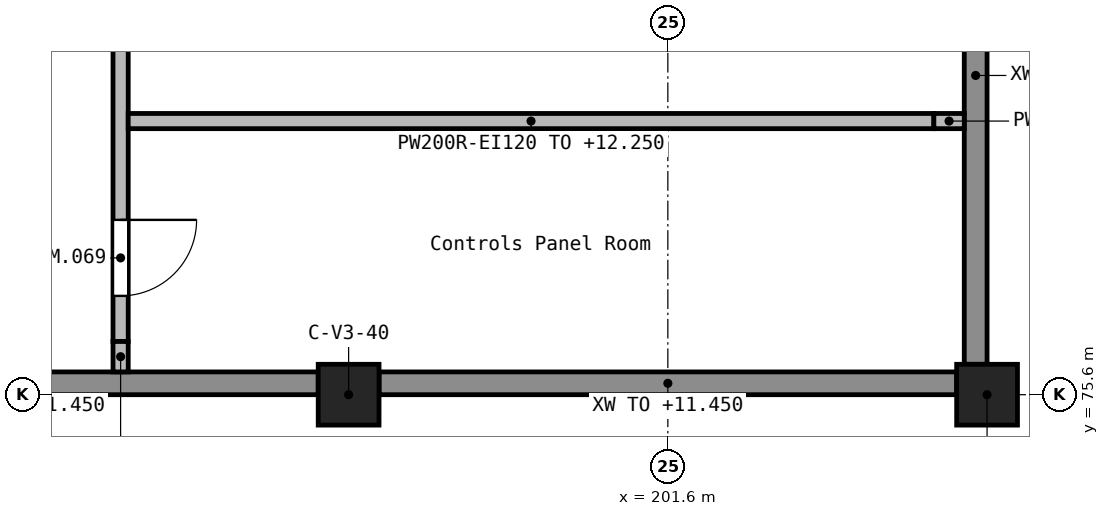
"""IFC4 building model, lengths in metres.
Left out: names, types, materials, properties, quantities, classifications, styles, units other than length and angle.
Written with IfcOpenShell. Run it as: python <this file> out.ifc"""

import sys

from ifc_helpers import new_model, si_unit, direction, frame, frame_2d, origin, origin_2d, place, context, subcontext, project, spatial, rectangle, extrude, element, fill, save


model = new_model("IFC4")
c1 = context("Model", 3, precision=1e-05, world=origin(), true_north=direction((0.0, 1.0)))
c2 = subcontext(c1, "Body", "Model", "MODEL_VIEW")
j1 = project(units=[si_unit("LENGTHUNIT", "METRE"), si_unit("PLANEANGLEUNIT", "RADIAN")], contexts=[c1])
p1 = place(None, origin())
s1 = spatial("IfcSite", under=j1, at=p1, CompositionType="ELEMENT")
p2 = place(p1, origin())
s2 = spatial("IfcBuilding", under=s1, at=p2, CompositionType="ELEMENT")
p3 = place(p2, frame((0.0, 0.0, 9.9)))
s3 = spatial("IfcBuildingStorey", under=s2, at=p3, CompositionType="ELEMENT", Elevation=9.9)
for number, where, z_axis, x_axis in (
    (1, (197.4, 75.6, 0.0), (0.0, 0.0, 1.0), (1.0, 0.0, 0.0)),
    (2, (205.8, 75.6, 0.0), (0.0, 0.0, 1.0), (1.0, 0.0, 0.0)),
):
    element("IfcColumn", number, at=place(p3, frame(where, z_axis=z_axis, x_axis=x_axis)), inside=s3, PredefinedType="COLUMN", context=c2, shape_type="SweptSolid", body=[
        extrude(rectangle(XDim=0.8, YDim=0.8, at=origin_2d()), origin(), (0.0, 0.0, 1.0), 2.7),
    ])
p4 = place(p3, frame((189.4, 75.75, 0.0), z_axis=(0.0, 0.0, 1.0), x_axis=(1.0, 0.0, 0.0)))
e3 = element("IfcWall", 3, at=p4, inside=s3, PredefinedType="STANDARD", context=c2, shape_type="SweptSolid", body=[
    extrude(rectangle(XDim=7.6, YDim=0.3, at=frame_2d((3.8, 0.0))), origin(), (0.0, 0.0, 1.0), 1.55),
])
p5 = place(p3, frame((197.8, 75.75, 0.0), z_axis=(0.0, 0.0, 1.0), x_axis=(1.0, 0.0, 0.0)))
e4 = element("IfcWall", 4, at=p5, inside=s3, PredefinedType="STANDARD", context=c2, shape_type="SweptSolid", body=[
    extrude(rectangle(XDim=7.6, YDim=0.3, at=frame_2d((3.8, 0.0))), origin(), (0.0, 0.0, 1.0), 1.55),
])
p6 = place(p3, frame((205.65, 76.0, 0.0), z_axis=(0.0, 0.0, 1.0), x_axis=(0.0, 1.0, 0.0)))
e5 = element("IfcWall", 5, at=p6, inside=s3, PredefinedType="STANDARD", context=c2, shape_type="SweptSolid", body=[
    extrude(rectangle(XDim=7.6, YDim=0.3, at=frame_2d((3.8, 0.0))), origin(), (0.0, 0.0, 1.0), 1.55),
])
p7 = place(p3, frame((194.4, 88.9, 0.0), z_axis=(0.0, 0.0, 1.0), x_axis=(0.0, -1.0, 0.0)))
e6 = element("IfcWall", 6, at=p7, inside=s3, PredefinedType="SOLIDWALL", context=c2, shape_type="SweptSolid", body=[
    extrude(rectangle(XDim=12.6, YDim=0.2, at=frame_2d((6.3, 0.0))), origin(), (0.0, 0.0, 1.0), 2.35),
])
p8 = place(p7, frame((1.6, 0.0, 0.0)))
e7 = element("IfcOpeningElement", 7, at=p8, cuts=e6, PredefinedType="OPENING", context=c2, shape_type="SweptSolid", body=[
    extrude(rectangle(XDim=1.8, YDim=2.1, at=frame_2d((0.9, 1.05))), frame((0.0, 0.11, 0.0), z_axis=(0.0, -1.0, 0.0), x_axis=(1.0, 0.0, 0.0)), (0.0, 0.0, 1.0), 0.22),
])
p9 = place(p7, frame((6.8, 0.0, 0.0)))
e8 = element("IfcOpeningElement", 8, at=p9, cuts=e6, PredefinedType="OPENING", context=c2, shape_type="SweptSolid", body=[
    extrude(rectangle(XDim=1.0, YDim=2.1, at=frame_2d((0.5, 1.05))), frame((0.0, 0.11, 0.0), z_axis=(0.0, -1.0, 0.0), x_axis=(1.0, 0.0, 0.0)), (0.0, 0.0, 1.0), 0.22),
])
p10 = place(p7, frame((11.0, 0.0, 0.0)))
e9 = element("IfcOpeningElement", 9, at=p10, cuts=e6, PredefinedType="OPENING", context=c2, shape_type="SweptSolid", body=[
    extrude(rectangle(XDim=1.0, YDim=2.1, at=frame_2d((0.5, 1.05))), frame((0.0, 0.11, 0.0), z_axis=(0.0, -1.0, 0.0), x_axis=(1.0, 0.0, 0.0)), (0.0, 0.0, 1.0), 0.22),
])
p11 = place(p3, frame((194.4, 76.3, 0.0), z_axis=(0.0, 0.0, 1.0), x_axis=(0.0, -1.0, 0.0)))
e10 = element("IfcWall", 10, at=p11, inside=s3, PredefinedType="SOLIDWALL", context=c2, shape_type="SweptSolid", body=[
    extrude(rectangle(XDim=0.4, YDim=0.2, at=frame_2d((0.2, 0.0))), origin(), (0.0, 0.0, 1.0), 1.58),
])
p12 = place(p3, frame((194.5, 79.2, 0.0), z_axis=(0.0, 0.0, 1.0), x_axis=(1.0, 0.0, 0.0)))
e11 = element("IfcWall", 11, at=p12, inside=s3, PredefinedType="SOLIDWALL", context=c2, shape_type="SweptSolid", body=[
    extrude(rectangle(XDim=10.6, YDim=0.2, at=frame_2d((5.3, 0.0))), origin(), (0.0, 0.0, 1.0), 2.35),
])
p13 = place(p3, frame((205.1, 79.2, 0.0), z_axis=(0.0, 0.0, 1.0), x_axis=(1.0, 0.0, 0.0)))
e12 = element("IfcWall", 12, at=p13, inside=s3, PredefinedType="SOLIDWALL", context=c2, shape_type="SweptSolid", body=[
    extrude(rectangle(XDim=0.4, YDim=0.2, at=frame_2d((0.2, 0.0))), origin(), (0.0, 0.0, 1.0), 1.58),
])
p14 = place(p10, origin())
e13 = element("IfcDoor", 13, at=p14, inside=s3, OperationType="SINGLE_SWING_RIGHT", PredefinedType="DOOR", context=c2, shape_type="SweptSolid", body=[
    extrude(rectangle(XDim=1.0, YDim=2.1, at=frame_2d((0.5, 1.05))), frame((0.0, 0.025, 0.0), z_axis=(0.0, -1.0, 0.0), x_axis=(1.0, 0.0, 0.0)), (0.0, 0.0, 1.0), 0.05),
])
fill(e9, e13)
save(model, sys.argv[1])
